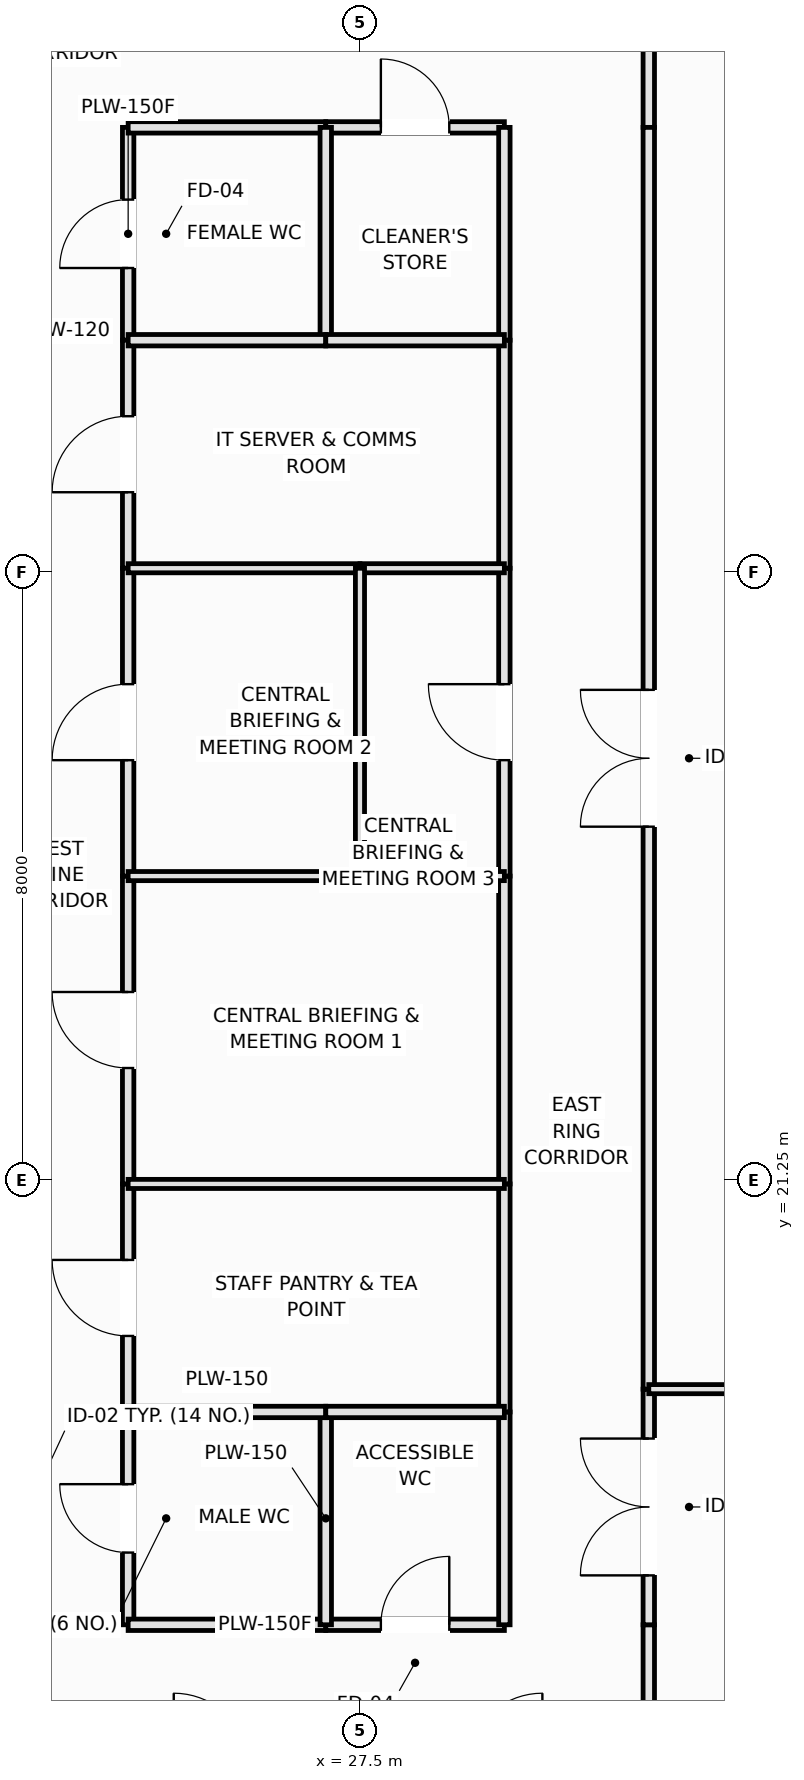
"""IFC4 building model, lengths in metres.
Left out: names, types, materials, properties, quantities, classifications, styles, units other than length and angle.
Written with IfcOpenShell. Run it as: python <this file> out.ifc"""

import sys

from ifc_helpers import new_model, si_unit, direction, frame, frame_2d, origin, place, context, subcontext, project, spatial, rectangle, extrude, element, fill, save


model = new_model("IFC4")
c1 = context("Model", 3, precision=1e-05, world=origin(), true_north=direction((0.0, 1.0)))
c2 = subcontext(c1, "Body", "Model", "MODEL_VIEW")
j1 = project(units=[si_unit("LENGTHUNIT", "METRE"), si_unit("PLANEANGLEUNIT", "RADIAN")], contexts=[c1])
p1 = place(None, origin())
s1 = spatial("IfcSite", under=j1, at=p1, CompositionType="ELEMENT")
p2 = place(p1, origin())
s2 = spatial("IfcBuilding", under=s1, at=p2, CompositionType="ELEMENT")
p3 = place(p2, frame((0.0, 0.0, 89.5)))
s3 = spatial("IfcBuildingStorey", under=s2, at=p3, CompositionType="ELEMENT", Elevation=89.5)
p4 = place(p3, frame((24.45, 15.4, 0.0), z_axis=(0.0, 0.0, 1.0), x_axis=(0.0, 1.0, 0.0)))
e1 = element("IfcWall", 1, at=p4, inside=s3, PredefinedType="PLUMBINGWALL", context=c2, shape_type="SweptSolid", body=[
    extrude(rectangle(XDim=2.8, YDim=0.15, at=frame_2d((1.4, 0.0))), origin(), (0.0, 0.0, 1.0), 3.35),
])
p5 = place(p4, frame((0.95, 0.0, 0.0)))
e2 = element("IfcOpeningElement", 2, at=p5, cuts=e1, PredefinedType="OPENING", context=c2, shape_type="SweptSolid", body=[
    extrude(rectangle(XDim=0.9, YDim=2.1, at=frame_2d((0.45, 1.05))), frame((0.0, 0.085, 0.0), z_axis=(0.0, -1.0, 0.0), x_axis=(1.0, 0.0, 0.0)), (0.0, 0.0, 1.0), 0.17),
])
p6 = place(p3, frame((24.45, 32.3, 0.0), z_axis=(0.0, 0.0, 1.0), x_axis=(0.0, 1.0, 0.0)))
e3 = element("IfcWall", 3, at=p6, inside=s3, PredefinedType="PLUMBINGWALL", context=c2, shape_type="SweptSolid", body=[
    extrude(rectangle(XDim=2.8, YDim=0.15, at=frame_2d((1.4, 0.0))), origin(), (0.0, 0.0, 1.0), 3.35),
])
p7 = place(p6, frame((0.95, 0.0, 0.0)))
e4 = element("IfcOpeningElement", 4, at=p7, cuts=e3, PredefinedType="OPENING", context=c2, shape_type="SweptSolid", body=[
    extrude(rectangle(XDim=0.9, YDim=2.1, at=frame_2d((0.45, 1.05))), frame((0.0, 0.085, 0.0), z_axis=(0.0, -1.0, 0.0), x_axis=(1.0, 0.0, 0.0)), (0.0, 0.0, 1.0), 0.17),
])
p8 = place(p3, frame((24.45, 18.2, 0.0), z_axis=(0.0, 0.0, 1.0), x_axis=(0.0, 1.0, 0.0)))
e5 = element("IfcWall", 5, at=p8, inside=s3, PredefinedType="PARTITIONING", context=c2, shape_type="SweptSolid", body=[
    extrude(rectangle(XDim=3.0, YDim=0.15, at=frame_2d((1.5, 0.0))), origin(), (0.0, 0.0, 1.0), 3.35),
])
p9 = place(p8, frame((1.0, 0.0, 0.0)))
e6 = element("IfcOpeningElement", 6, at=p9, cuts=e5, PredefinedType="OPENING", context=c2, shape_type="SweptSolid", body=[
    extrude(rectangle(XDim=1.0, YDim=2.15, at=frame_2d((0.5, 1.075))), frame((0.0, 0.085, 0.0), z_axis=(0.0, -1.0, 0.0), x_axis=(1.0, 0.0, 0.0)), (0.0, 0.0, 1.0), 0.17),
])
p10 = place(p3, frame((24.45, 29.3, 0.0), z_axis=(0.0, 0.0, 1.0), x_axis=(0.0, 1.0, 0.0)))
e7 = element("IfcWall", 7, at=p10, inside=s3, PredefinedType="PARTITIONING", context=c2, shape_type="SweptSolid", body=[
    extrude(rectangle(XDim=3.0, YDim=0.15, at=frame_2d((1.5, 0.0))), origin(), (0.0, 0.0, 1.0), 3.35),
])
p11 = place(p10, frame((1.0, 0.0, 0.0)))
e8 = element("IfcOpeningElement", 8, at=p11, cuts=e7, PredefinedType="OPENING", context=c2, shape_type="SweptSolid", body=[
    extrude(rectangle(XDim=1.0, YDim=2.15, at=frame_2d((0.5, 1.075))), frame((0.0, 0.085, 0.0), z_axis=(0.0, -1.0, 0.0), x_axis=(1.0, 0.0, 0.0)), (0.0, 0.0, 1.0), 0.17),
])
p12 = place(p3, frame((24.45, 21.2, 0.0), z_axis=(0.0, 0.0, 1.0), x_axis=(0.0, 1.0, 0.0)))
e9 = element("IfcWall", 9, at=p12, inside=s3, PredefinedType="PARTITIONING", context=c2, shape_type="SweptSolid", body=[
    extrude(rectangle(XDim=4.05, YDim=0.15, at=frame_2d((2.025, 0.0))), origin(), (0.0, 0.0, 1.0), 3.35),
])
p13 = place(p12, frame((1.525, 0.0, 0.0)))
e10 = element("IfcOpeningElement", 10, at=p13, cuts=e9, PredefinedType="OPENING", context=c2, shape_type="SweptSolid", body=[
    extrude(rectangle(XDim=1.0, YDim=2.15, at=frame_2d((0.5, 1.075))), frame((0.0, 0.085, 0.0), z_axis=(0.0, -1.0, 0.0), x_axis=(1.0, 0.0, 0.0)), (0.0, 0.0, 1.0), 0.17),
])
p14 = place(p3, frame((24.45, 25.25, 0.0), z_axis=(0.0, 0.0, 1.0), x_axis=(0.0, 1.0, 0.0)))
e11 = element("IfcWall", 11, at=p14, inside=s3, PredefinedType="PARTITIONING", context=c2, shape_type="SweptSolid", body=[
    extrude(rectangle(XDim=4.05, YDim=0.15, at=frame_2d((2.025, 0.0))), origin(), (0.0, 0.0, 1.0), 3.35),
])
p15 = place(p14, frame((1.525, 0.0, 0.0)))
e12 = element("IfcOpeningElement", 12, at=p15, cuts=e11, PredefinedType="OPENING", context=c2, shape_type="SweptSolid", body=[
    extrude(rectangle(XDim=1.0, YDim=2.15, at=frame_2d((0.5, 1.075))), frame((0.0, 0.085, 0.0), z_axis=(0.0, -1.0, 0.0), x_axis=(1.0, 0.0, 0.0)), (0.0, 0.0, 1.0), 0.17),
])
p16 = place(p3, frame((24.45, 15.4, 0.0), z_axis=(0.0, 0.0, 1.0), x_axis=(1.0, 0.0, 0.0)))
e13 = element("IfcWall", 13, at=p16, inside=s3, PredefinedType="PLUMBINGWALL", context=c2, shape_type="SweptSolid", body=[
    extrude(rectangle(XDim=2.6, YDim=0.15, at=frame_2d((1.3, 0.0))), origin(), (0.0, 0.0, 1.0), 3.35),
])
p17 = place(p3, frame((27.05, 15.4, 0.0), z_axis=(0.0, 0.0, 1.0), x_axis=(1.0, 0.0, 0.0)))
e14 = element("IfcWall", 14, at=p17, inside=s3, PredefinedType="PLUMBINGWALL", context=c2, shape_type="SweptSolid", body=[
    extrude(rectangle(XDim=2.35, YDim=0.15, at=frame_2d((1.175, 0.0))), origin(), (0.0, 0.0, 1.0), 3.35),
])
p18 = place(p17, frame((0.725, 0.0, 0.0)))
e15 = element("IfcOpeningElement", 15, at=p18, cuts=e14, PredefinedType="OPENING", context=c2, shape_type="SweptSolid", body=[
    extrude(rectangle(XDim=0.9, YDim=2.1, at=frame_2d((0.45, 1.05))), frame((0.0, 0.085, 0.0), z_axis=(0.0, -1.0, 0.0), x_axis=(1.0, 0.0, 0.0)), (0.0, 0.0, 1.0), 0.17),
])
p19 = place(p3, frame((31.3, 13.5, 0.0), z_axis=(0.0, 0.0, 1.0), x_axis=(0.0, 1.0, 0.0)))
e16 = element("IfcWall", 16, at=p19, inside=s3, PredefinedType="PARTITIONING", context=c2, shape_type="SweptSolid", body=[
    extrude(rectangle(XDim=1.9, YDim=0.15, at=frame_2d((0.95, 0.0))), origin(), (0.0, 0.0, 1.0), 3.35),
])
p20 = place(p3, frame((24.45, 35.1, 0.0), z_axis=(0.0, 0.0, 1.0), x_axis=(1.0, 0.0, 0.0)))
e17 = element("IfcWall", 17, at=p20, inside=s3, PredefinedType="PLUMBINGWALL", context=c2, shape_type="SweptSolid", body=[
    extrude(rectangle(XDim=2.6, YDim=0.15, at=frame_2d((1.3, 0.0))), origin(), (0.0, 0.0, 1.0), 3.35),
])
p21 = place(p3, frame((27.05, 35.1, 0.0), z_axis=(0.0, 0.0, 1.0), x_axis=(1.0, 0.0, 0.0)))
e18 = element("IfcWall", 18, at=p21, inside=s3, PredefinedType="PLUMBINGWALL", context=c2, shape_type="SweptSolid", body=[
    extrude(rectangle(XDim=2.35, YDim=0.15, at=frame_2d((1.175, 0.0))), origin(), (0.0, 0.0, 1.0), 3.35),
])
p22 = place(p21, frame((0.725, 0.0, 0.0)))
e19 = element("IfcOpeningElement", 19, at=p22, cuts=e18, PredefinedType="OPENING", context=c2, shape_type="SweptSolid", body=[
    extrude(rectangle(XDim=0.9, YDim=2.1, at=frame_2d((0.45, 1.05))), frame((0.0, 0.085, 0.0), z_axis=(0.0, -1.0, 0.0), x_axis=(1.0, 0.0, 0.0)), (0.0, 0.0, 1.0), 0.17),
])
p23 = place(p3, frame((31.3, 35.1, 0.0), z_axis=(0.0, 0.0, 1.0), x_axis=(0.0, 1.0, 0.0)))
e20 = element("IfcWall", 20, at=p23, inside=s3, PredefinedType="PARTITIONING", context=c2, shape_type="SweptSolid", body=[
    extrude(rectangle(XDim=1.9, YDim=0.15, at=frame_2d((0.95, 0.0))), origin(), (0.0, 0.0, 1.0), 3.35),
])
for number, where, z_axis, x_axis in (
    (21, (29.4, 15.4, 0.0), (0.0, 0.0, 1.0), (0.0, 1.0, 0.0)),
    (22, (29.4, 32.3, 0.0), (0.0, 0.0, 1.0), (0.0, 1.0, 0.0)),
):
    element("IfcWall", number, at=place(p3, frame(where, z_axis=z_axis, x_axis=x_axis)), inside=s3, PredefinedType="PLUMBINGWALL", context=c2, shape_type="SweptSolid", body=[
        extrude(rectangle(XDim=2.8, YDim=0.15, at=frame_2d((1.4, 0.0))), origin(), (0.0, 0.0, 1.0), 3.35),
    ])
for number, where, z_axis, x_axis in (
    (23, (29.4, 18.2, 0.0), (0.0, 0.0, 1.0), (0.0, 1.0, 0.0)),
    (24, (29.4, 29.3, 0.0), (0.0, 0.0, 1.0), (0.0, 1.0, 0.0)),
):
    element("IfcWall", number, at=place(p3, frame(where, z_axis=z_axis, x_axis=x_axis)), inside=s3, PredefinedType="PARTITIONING", context=c2, shape_type="SweptSolid", body=[
        extrude(rectangle(XDim=3.0, YDim=0.15, at=frame_2d((1.5, 0.0))), origin(), (0.0, 0.0, 1.0), 3.35),
    ])
p24 = place(p3, frame((29.4, 21.2, 0.0), z_axis=(0.0, 0.0, 1.0), x_axis=(0.0, 1.0, 0.0)))
e25 = element("IfcWall", 25, at=p24, inside=s3, PredefinedType="PARTITIONING", context=c2, shape_type="SweptSolid", body=[
    extrude(rectangle(XDim=4.05, YDim=0.15, at=frame_2d((2.025, 0.0))), origin(), (0.0, 0.0, 1.0), 3.35),
])
p25 = place(p3, frame((29.4, 25.25, 0.0), z_axis=(0.0, 0.0, 1.0), x_axis=(0.0, 1.0, 0.0)))
e26 = element("IfcWall", 26, at=p25, inside=s3, PredefinedType="PARTITIONING", context=c2, shape_type="SweptSolid", body=[
    extrude(rectangle(XDim=4.05, YDim=0.15, at=frame_2d((2.025, 0.0))), origin(), (0.0, 0.0, 1.0), 3.35),
])
p26 = place(p25, frame((1.525, 0.0, 0.0)))
e27 = element("IfcOpeningElement", 27, at=p26, cuts=e26, PredefinedType="OPENING", context=c2, shape_type="SweptSolid", body=[
    extrude(rectangle(XDim=1.0, YDim=2.15, at=frame_2d((0.5, 1.075))), frame((0.0, 0.085, 0.0), z_axis=(0.0, -1.0, 0.0), x_axis=(1.0, 0.0, 0.0)), (0.0, 0.0, 1.0), 0.17),
])
p27 = place(p3, frame((31.3, 15.4, 0.0), z_axis=(0.0, 0.0, 1.0), x_axis=(0.0, 1.0, 0.0)))
e28 = element("IfcWall", 28, at=p27, inside=s3, PredefinedType="PARTITIONING", context=c2, shape_type="SweptSolid", body=[
    extrude(rectangle(XDim=3.1, YDim=0.15, at=frame_2d((1.55, 0.0))), origin(), (0.0, 0.0, 1.0), 3.35),
])
p28 = place(p27, frame((0.65, 0.0, 0.0)))
e29 = element("IfcOpeningElement", 29, at=p28, cuts=e28, PredefinedType="OPENING", context=c2, shape_type="SweptSolid", body=[
    extrude(rectangle(XDim=1.8, YDim=2.2, at=frame_2d((0.9, 1.1))), frame((0.0, 0.085, 0.0), z_axis=(0.0, -1.0, 0.0), x_axis=(1.0, 0.0, 0.0)), (0.0, 0.0, 1.0), 0.17),
])
p29 = place(p3, frame((31.3, 18.5, 0.0), z_axis=(0.0, 0.0, 1.0), x_axis=(0.0, 1.0, 0.0)))
e30 = element("IfcWall", 30, at=p29, inside=s3, PredefinedType="PARTITIONING", context=c2, shape_type="SweptSolid", body=[
    extrude(rectangle(XDim=16.6, YDim=0.15, at=frame_2d((8.3, 0.0))), origin(), (0.0, 0.0, 1.0), 3.35),
])
p30 = place(p29, frame((7.4, 0.0, 0.0)))
e31 = element("IfcOpeningElement", 31, at=p30, cuts=e30, PredefinedType="OPENING", context=c2, shape_type="SweptSolid", body=[
    extrude(rectangle(XDim=1.8, YDim=2.2, at=frame_2d((0.9, 1.1))), frame((0.0, 0.085, 0.0), z_axis=(0.0, -1.0, 0.0), x_axis=(1.0, 0.0, 0.0)), (0.0, 0.0, 1.0), 0.17),
])
p31 = place(p3, frame((27.05, 15.4, 0.0), z_axis=(0.0, 0.0, 1.0), x_axis=(0.0, 1.0, 0.0)))
e32 = element("IfcWall", 32, at=p31, inside=s3, PredefinedType="PLUMBINGWALL", context=c2, shape_type="SweptSolid", body=[
    extrude(rectangle(XDim=2.8, YDim=0.15, at=frame_2d((1.4, 0.0))), origin(), (0.0, 0.0, 1.0), 3.35),
])
p32 = place(p3, frame((24.45, 18.2, 0.0), z_axis=(0.0, 0.0, 1.0), x_axis=(1.0, 0.0, 0.0)))
e33 = element("IfcWall", 33, at=p32, inside=s3, PredefinedType="PLUMBINGWALL", context=c2, shape_type="SweptSolid", body=[
    extrude(rectangle(XDim=2.6, YDim=0.15, at=frame_2d((1.3, 0.0))), origin(), (0.0, 0.0, 1.0), 3.35),
])
p33 = place(p3, frame((27.05, 18.2, 0.0), z_axis=(0.0, 0.0, 1.0), x_axis=(1.0, 0.0, 0.0)))
e34 = element("IfcWall", 34, at=p33, inside=s3, PredefinedType="PLUMBINGWALL", context=c2, shape_type="SweptSolid", body=[
    extrude(rectangle(XDim=2.35, YDim=0.15, at=frame_2d((1.175, 0.0))), origin(), (0.0, 0.0, 1.0), 3.35),
])
p34 = place(p3, frame((27.05, 32.3, 0.0), z_axis=(0.0, 0.0, 1.0), x_axis=(0.0, 1.0, 0.0)))
e35 = element("IfcWall", 35, at=p34, inside=s3, PredefinedType="PLUMBINGWALL", context=c2, shape_type="SweptSolid", body=[
    extrude(rectangle(XDim=2.8, YDim=0.15, at=frame_2d((1.4, 0.0))), origin(), (0.0, 0.0, 1.0), 3.35),
])
p35 = place(p3, frame((24.45, 32.3, 0.0), z_axis=(0.0, 0.0, 1.0), x_axis=(1.0, 0.0, 0.0)))
e36 = element("IfcWall", 36, at=p35, inside=s3, PredefinedType="PLUMBINGWALL", context=c2, shape_type="SweptSolid", body=[
    extrude(rectangle(XDim=2.6, YDim=0.15, at=frame_2d((1.3, 0.0))), origin(), (0.0, 0.0, 1.0), 3.35),
])
p36 = place(p3, frame((27.05, 32.3, 0.0), z_axis=(0.0, 0.0, 1.0), x_axis=(1.0, 0.0, 0.0)))
e37 = element("IfcWall", 37, at=p36, inside=s3, PredefinedType="PLUMBINGWALL", context=c2, shape_type="SweptSolid", body=[
    extrude(rectangle(XDim=2.35, YDim=0.15, at=frame_2d((1.175, 0.0))), origin(), (0.0, 0.0, 1.0), 3.35),
])
p37 = place(p3, frame((24.45, 21.2, 0.0), z_axis=(0.0, 0.0, 1.0), x_axis=(1.0, 0.0, 0.0)))
e38 = element("IfcWall", 38, at=p37, inside=s3, PredefinedType="PARTITIONING", context=c2, shape_type="SweptSolid", body=[
    extrude(rectangle(XDim=4.95, YDim=0.12, at=frame_2d((2.475, 0.0))), origin(), (0.0, 0.0, 1.0), 3.35),
])
p38 = place(p3, frame((24.45, 29.3, 0.0), z_axis=(0.0, 0.0, 1.0), x_axis=(1.0, 0.0, 0.0)))
e39 = element("IfcWall", 39, at=p38, inside=s3, PredefinedType="PARTITIONING", context=c2, shape_type="SweptSolid", body=[
    extrude(rectangle(XDim=3.05, YDim=0.12, at=frame_2d((1.525, 0.0))), origin(), (0.0, 0.0, 1.0), 3.35),
])
p39 = place(p3, frame((27.5, 29.3, 0.0), z_axis=(0.0, 0.0, 1.0), x_axis=(1.0, 0.0, 0.0)))
e40 = element("IfcWall", 40, at=p39, inside=s3, PredefinedType="PARTITIONING", context=c2, shape_type="SweptSolid", body=[
    extrude(rectangle(XDim=1.9, YDim=0.12, at=frame_2d((0.95, 0.0))), origin(), (0.0, 0.0, 1.0), 3.35),
])
p40 = place(p3, frame((24.45, 25.25, 0.0), z_axis=(0.0, 0.0, 1.0), x_axis=(1.0, 0.0, 0.0)))
e41 = element("IfcWall", 41, at=p40, inside=s3, PredefinedType="PARTITIONING", context=c2, shape_type="SweptSolid", body=[
    extrude(rectangle(XDim=3.05, YDim=0.12, at=frame_2d((1.525, 0.0))), origin(), (0.0, 0.0, 1.0), 2.7),
])
p41 = place(p3, frame((27.5, 25.25, 0.0), z_axis=(0.0, 0.0, 1.0), x_axis=(1.0, 0.0, 0.0)))
e42 = element("IfcWall", 42, at=p41, inside=s3, PredefinedType="PARTITIONING", context=c2, shape_type="SweptSolid", body=[
    extrude(rectangle(XDim=1.9, YDim=0.12, at=frame_2d((0.95, 0.0))), origin(), (0.0, 0.0, 1.0), 2.7),
])
p42 = place(p3, frame((27.5, 25.25, 0.0), z_axis=(0.0, 0.0, 1.0), x_axis=(0.0, 1.0, 0.0)))
e43 = element("IfcWall", 43, at=p42, inside=s3, PredefinedType="PARTITIONING", context=c2, shape_type="SweptSolid", body=[
    extrude(rectangle(XDim=4.05, YDim=0.12, at=frame_2d((2.025, 0.0))), origin(), (0.0, 0.0, 1.0), 3.35),
])
p43 = place(p3, frame((31.3, 18.5, 0.0), z_axis=(0.0, 0.0, 1.0), x_axis=(1.0, 0.0, 0.0)))
e44 = element("IfcWall", 44, at=p43, inside=s3, PredefinedType="PARTITIONING", context=c2, shape_type="SweptSolid", body=[
    extrude(rectangle(XDim=22.19, YDim=0.12, at=frame_2d((11.095, 0.0))), origin(), (0.0, 0.0, 1.0), 2.7),
])
p44 = place(p5, origin())
e45 = element("IfcDoor", 45, at=p44, inside=s3, OperationType="SINGLE_SWING_RIGHT", PredefinedType="DOOR", context=c2, shape_type="SweptSolid", body=[
    extrude(rectangle(XDim=0.9, YDim=2.1, at=frame_2d((0.45, 1.05))), frame((0.0, 0.025, 0.0), z_axis=(0.0, -1.0, 0.0), x_axis=(1.0, 0.0, 0.0)), (0.0, 0.0, 1.0), 0.05),
])
fill(e2, e45)
p45 = place(p7, origin())
e46 = element("IfcDoor", 46, at=p45, inside=s3, OperationType="SINGLE_SWING_LEFT", PredefinedType="DOOR", context=c2, shape_type="SweptSolid", body=[
    extrude(rectangle(XDim=0.9, YDim=2.1, at=frame_2d((0.45, 1.05))), frame((0.0, 0.025, 0.0), z_axis=(0.0, -1.0, 0.0), x_axis=(1.0, 0.0, 0.0)), (0.0, 0.0, 1.0), 0.05),
])
fill(e4, e46)
p46 = place(p9, origin())
e47 = element("IfcDoor", 47, at=p46, inside=s3, OperationType="SINGLE_SWING_RIGHT", PredefinedType="DOOR", context=c2, shape_type="SweptSolid", body=[
    extrude(rectangle(XDim=1.0, YDim=2.15, at=frame_2d((0.5, 1.075))), frame((0.0, 0.025, 0.0), z_axis=(0.0, -1.0, 0.0), x_axis=(1.0, 0.0, 0.0)), (0.0, 0.0, 1.0), 0.05),
])
fill(e6, e47)
p47 = place(p11, origin())
e48 = element("IfcDoor", 48, at=p47, inside=s3, OperationType="SINGLE_SWING_LEFT", PredefinedType="DOOR", context=c2, shape_type="SweptSolid", body=[
    extrude(rectangle(XDim=1.0, YDim=2.15, at=frame_2d((0.5, 1.075))), frame((0.0, 0.025, 0.0), z_axis=(0.0, -1.0, 0.0), x_axis=(1.0, 0.0, 0.0)), (0.0, 0.0, 1.0), 0.05),
])
fill(e8, e48)
p48 = place(p13, origin())
e49 = element("IfcDoor", 49, at=p48, inside=s3, OperationType="SINGLE_SWING_RIGHT", PredefinedType="DOOR", context=c2, shape_type="SweptSolid", body=[
    extrude(rectangle(XDim=1.0, YDim=2.15, at=frame_2d((0.5, 1.075))), frame((0.0, 0.025, 0.0), z_axis=(0.0, -1.0, 0.0), x_axis=(1.0, 0.0, 0.0)), (0.0, 0.0, 1.0), 0.05),
])
fill(e10, e49)
p49 = place(p15, origin())
e50 = element("IfcDoor", 50, at=p49, inside=s3, OperationType="SINGLE_SWING_LEFT", PredefinedType="DOOR", context=c2, shape_type="SweptSolid", body=[
    extrude(rectangle(XDim=1.0, YDim=2.15, at=frame_2d((0.5, 1.075))), frame((0.0, 0.025, 0.0), z_axis=(0.0, -1.0, 0.0), x_axis=(1.0, 0.0, 0.0)), (0.0, 0.0, 1.0), 0.05),
])
fill(e12, e50)
p50 = place(p18, origin())
e51 = element("IfcDoor", 51, at=p50, inside=s3, OperationType="SINGLE_SWING_RIGHT", PredefinedType="DOOR", context=c2, shape_type="SweptSolid", body=[
    extrude(rectangle(XDim=0.9, YDim=2.1, at=frame_2d((0.45, 1.05))), frame((0.0, 0.025, 0.0), z_axis=(0.0, -1.0, 0.0), x_axis=(1.0, 0.0, 0.0)), (0.0, 0.0, 1.0), 0.05),
])
fill(e15, e51)
p51 = place(p22, origin())
e52 = element("IfcDoor", 52, at=p51, inside=s3, OperationType="SINGLE_SWING_LEFT", PredefinedType="DOOR", context=c2, shape_type="SweptSolid", body=[
    extrude(rectangle(XDim=0.9, YDim=2.1, at=frame_2d((0.45, 1.05))), frame((0.0, 0.025, 0.0), z_axis=(0.0, -1.0, 0.0), x_axis=(1.0, 0.0, 0.0)), (0.0, 0.0, 1.0), 0.05),
])
fill(e19, e52)
p52 = place(p26, origin())
e53 = element("IfcDoor", 53, at=p52, inside=s3, OperationType="SINGLE_SWING_RIGHT", PredefinedType="DOOR", context=c2, shape_type="SweptSolid", body=[
    extrude(rectangle(XDim=1.0, YDim=2.15, at=frame_2d((0.5, 1.075))), frame((0.0, 0.025, 0.0), z_axis=(0.0, -1.0, 0.0), x_axis=(1.0, 0.0, 0.0)), (0.0, 0.0, 1.0), 0.05),
])
fill(e27, e53)
p53 = place(p28, origin())
e54 = element("IfcDoor", 54, at=p53, inside=s3, OperationType="DOUBLE_DOOR_SINGLE_SWING", PredefinedType="DOOR", context=c2, shape_type="SweptSolid", body=[
    extrude(rectangle(XDim=1.8, YDim=2.2, at=frame_2d((0.9, 1.1))), frame((0.0, 0.025, 0.0), z_axis=(0.0, -1.0, 0.0), x_axis=(1.0, 0.0, 0.0)), (0.0, 0.0, 1.0), 0.05),
])
fill(e29, e54)
p54 = place(p30, origin())
e55 = element("IfcDoor", 55, at=p54, inside=s3, OperationType="DOUBLE_DOOR_SINGLE_SWING", PredefinedType="DOOR", context=c2, shape_type="SweptSolid", body=[
    extrude(rectangle(XDim=1.8, YDim=2.2, at=frame_2d((0.9, 1.1))), frame((0.0, 0.025, 0.0), z_axis=(0.0, -1.0, 0.0), x_axis=(1.0, 0.0, 0.0)), (0.0, 0.0, 1.0), 0.05),
])
fill(e31, e55)
save(model, sys.argv[1])
